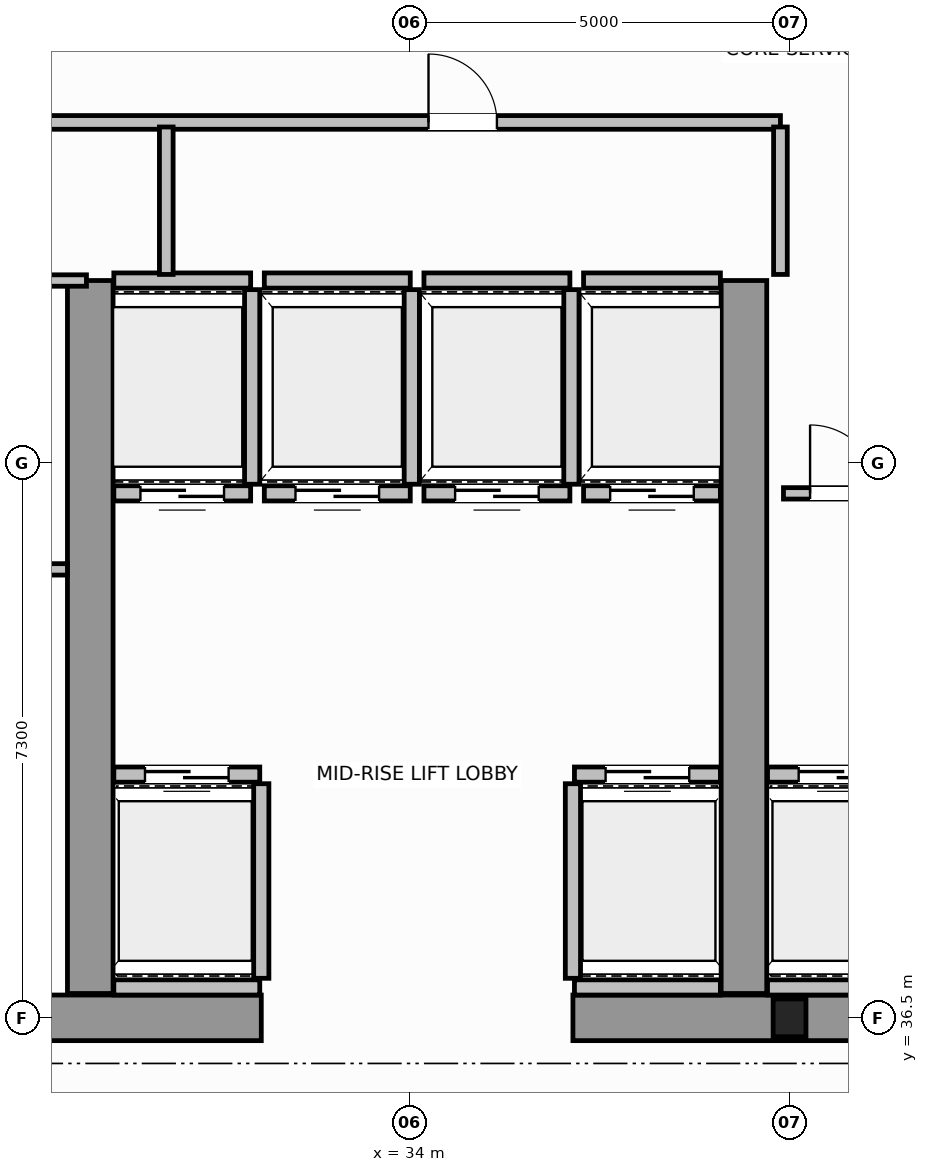
"""IFC4 building model, lengths in metres.
Left out: names, types, materials, properties, quantities, classifications, styles, units other than length and angle.
Written with IfcOpenShell. Run it as: python <this file> out.ifc"""

import sys

from ifc_helpers import new_model, si_unit, direction, frame, frame_2d, origin, origin_2d, place, context, subcontext, project, spatial, rectangle, i_section, extrude, source, transform, mapped, element, fill, save


model = new_model("IFC4")
c1 = context("Model", 3, precision=1e-05, world=origin(), true_north=direction((0.0, 1.0)))
c2 = subcontext(c1, "Body", "Model", "MODEL_VIEW")
j1 = project(units=[si_unit("LENGTHUNIT", "METRE"), si_unit("PLANEANGLEUNIT", "RADIAN")], contexts=[c1])
p1 = place(None, origin())
s1 = spatial("IfcSite", under=j1, at=p1, CompositionType="ELEMENT")
p2 = place(p1, origin())
s2 = spatial("IfcBuilding", under=s1, at=p2, CompositionType="ELEMENT")
p3 = place(p2, frame((0.0, 0.0, 199.4)))
s3 = spatial("IfcBuildingStorey", under=s2, at=p3, CompositionType="ELEMENT", Elevation=199.4)
m1 = source(origin(), c2, "Body", "SweptSolid", [
    extrude(i_section(OverallWidth=0.432, OverallDepth=0.498, WebThickness=0.055, FlangeThickness=0.068, FilletRadius=0.015, at=origin_2d()), origin(), (0.0, 0.0, 1.0), 3.8),
])
p4 = place(p3, frame((39.0, 36.5, 0.0), z_axis=(0.0, 0.0, 1.0), x_axis=(1.0, 0.0, 0.0)))
e1 = element("IfcColumn", 1, at=p4, inside=s3, PredefinedType="COLUMN", context=c2, shape_type="MappedRepresentation", body=[
    mapped(m1, transform((0.0, 0.0, 0.0), scale=1.0)),
])
for number, where, z_axis, x_axis in (
    (2, (27.55, 36.5, 0.0), (0.0, 0.0, 1.0), (1.0, 0.0, 0.0)),
    (3, (36.15, 36.5, 0.0), (0.0, 0.0, 1.0), (1.0, 0.0, 0.0)),
):
    element("IfcWall", number, at=place(p3, frame(where, z_axis=z_axis, x_axis=x_axis)), inside=s3, PredefinedType="SHEAR", context=c2, shape_type="SweptSolid", body=[
        extrude(rectangle(XDim=4.5, YDim=0.6, at=frame_2d((2.25, 0.0))), origin(), (0.0, 0.0, 1.0), 3.8),
    ])
for number, where, z_axis, x_axis in (
    (4, (29.8, 36.82, 0.0), (0.0, 0.0, 1.0), (0.0, 1.0, 0.0)),
    (5, (38.4, 36.82, 0.0), (0.0, 0.0, 1.0), (0.0, 1.0, 0.0)),
):
    element("IfcWall", number, at=place(p3, frame(where, z_axis=z_axis, x_axis=x_axis)), inside=s3, PredefinedType="SHEAR", context=c2, shape_type="SweptSolid", body=[
        extrude(rectangle(XDim=9.38, YDim=0.6, at=frame_2d((4.69, 0.0))), origin(), (0.0, 0.0, 1.0), 3.8),
    ])
p5 = place(p3, frame((30.11, 39.7, 0.0), z_axis=(0.0, 0.0, 1.0), x_axis=(1.0, 0.0, 0.0)))
e6 = element("IfcWall", 6, at=p5, inside=s3, PredefinedType="SOLIDWALL", context=c2, shape_type="SweptSolid", body=[
    extrude(rectangle(XDim=1.92, YDim=0.2, at=frame_2d((0.96, 0.0))), origin(), (0.0, 0.0, 1.0), 3.58),
])
p6 = place(p5, frame((0.41, 0.0, 0.0)))
e7 = element("IfcOpeningElement", 7, at=p6, cuts=e6, PredefinedType="OPENING", context=c2, shape_type="SweptSolid", body=[
    extrude(rectangle(XDim=1.1, YDim=2.15, at=frame_2d((0.55, 1.075))), frame((0.0, 0.11, 0.0), z_axis=(0.0, -1.0, 0.0), x_axis=(1.0, 0.0, 0.0)), (0.0, 0.0, 1.0), 0.22),
])
p7 = place(p3, frame((30.11, 36.9, 0.0), z_axis=(0.0, 0.0, 1.0), x_axis=(1.0, 0.0, 0.0)))
e8 = element("IfcWall", 8, at=p7, inside=s3, PredefinedType="SOLIDWALL", context=c2, shape_type="SweptSolid", body=[
    extrude(rectangle(XDim=1.92, YDim=0.2, at=frame_2d((0.96, 0.0))), origin(), (0.0, 0.0, 1.0), 3.58),
])
p8 = place(p3, frame((32.05, 37.02, 0.0), z_axis=(0.0, 0.0, 1.0), x_axis=(0.0, 1.0, 0.0)))
e9 = element("IfcWall", 9, at=p8, inside=s3, PredefinedType="SOLIDWALL", context=c2, shape_type="SweptSolid", body=[
    extrude(rectangle(XDim=2.56, YDim=0.2, at=frame_2d((1.28, 0.0))), origin(), (0.0, 0.0, 1.0), 3.58),
])
p9 = place(p3, frame((36.17, 39.7, 0.0), z_axis=(0.0, 0.0, 1.0), x_axis=(1.0, 0.0, 0.0)))
e10 = element("IfcWall", 10, at=p9, inside=s3, PredefinedType="SOLIDWALL", context=c2, shape_type="SweptSolid", body=[
    extrude(rectangle(XDim=1.92, YDim=0.2, at=frame_2d((0.96, 0.0))), origin(), (0.0, 0.0, 1.0), 3.58),
])
p10 = place(p9, frame((0.41, 0.0, 0.0)))
e11 = element("IfcOpeningElement", 11, at=p10, cuts=e10, PredefinedType="OPENING", context=c2, shape_type="SweptSolid", body=[
    extrude(rectangle(XDim=1.1, YDim=2.15, at=frame_2d((0.55, 1.075))), frame((0.0, 0.11, 0.0), z_axis=(0.0, -1.0, 0.0), x_axis=(1.0, 0.0, 0.0)), (0.0, 0.0, 1.0), 0.22),
])
p11 = place(p3, frame((36.17, 36.9, 0.0), z_axis=(0.0, 0.0, 1.0), x_axis=(1.0, 0.0, 0.0)))
e12 = element("IfcWall", 12, at=p11, inside=s3, PredefinedType="SOLIDWALL", context=c2, shape_type="SweptSolid", body=[
    extrude(rectangle(XDim=1.92, YDim=0.2, at=frame_2d((0.96, 0.0))), origin(), (0.0, 0.0, 1.0), 3.58),
])
p12 = place(p3, frame((36.15, 37.02, 0.0), z_axis=(0.0, 0.0, 1.0), x_axis=(0.0, 1.0, 0.0)))
e13 = element("IfcWall", 13, at=p12, inside=s3, PredefinedType="SOLIDWALL", context=c2, shape_type="SweptSolid", body=[
    extrude(rectangle(XDim=2.56, YDim=0.2, at=frame_2d((1.28, 0.0))), origin(), (0.0, 0.0, 1.0), 3.58),
])
p13 = place(p3, frame((30.11, 43.4, 0.0), z_axis=(0.0, 0.0, 1.0), x_axis=(1.0, 0.0, 0.0)))
e14 = element("IfcWall", 14, at=p13, inside=s3, PredefinedType="SOLIDWALL", context=c2, shape_type="SweptSolid", body=[
    extrude(rectangle(XDim=1.8, YDim=0.2, at=frame_2d((0.9, 0.0))), origin(), (0.0, 0.0, 1.0), 3.58),
])
p14 = place(p13, frame((0.35, 0.0, 0.0)))
e15 = element("IfcOpeningElement", 15, at=p14, cuts=e14, PredefinedType="OPENING", context=c2, shape_type="SweptSolid", body=[
    extrude(rectangle(XDim=1.1, YDim=2.15, at=frame_2d((0.55, 1.075))), frame((0.0, 0.11, 0.0), z_axis=(0.0, -1.0, 0.0), x_axis=(1.0, 0.0, 0.0)), (0.0, 0.0, 1.0), 0.22),
])
p15 = place(p3, frame((30.11, 46.2, 0.0), z_axis=(0.0, 0.0, 1.0), x_axis=(1.0, 0.0, 0.0)))
e16 = element("IfcWall", 16, at=p15, inside=s3, PredefinedType="SOLIDWALL", context=c2, shape_type="SweptSolid", body=[
    extrude(rectangle(XDim=1.8, YDim=0.2, at=frame_2d((0.9, 0.0))), origin(), (0.0, 0.0, 1.0), 3.58),
])
p16 = place(p3, frame((31.93, 43.52, 0.0), z_axis=(0.0, 0.0, 1.0), x_axis=(0.0, 1.0, 0.0)))
e17 = element("IfcWall", 17, at=p16, inside=s3, PredefinedType="SOLIDWALL", context=c2, shape_type="SweptSolid", body=[
    extrude(rectangle(XDim=2.56, YDim=0.2, at=frame_2d((1.28, 0.0))), origin(), (0.0, 0.0, 1.0), 3.58),
])
p17 = place(p3, frame((32.09, 43.4, 0.0), z_axis=(0.0, 0.0, 1.0), x_axis=(1.0, 0.0, 0.0)))
e18 = element("IfcWall", 18, at=p17, inside=s3, PredefinedType="SOLIDWALL", context=c2, shape_type="SweptSolid", body=[
    extrude(rectangle(XDim=1.92, YDim=0.2, at=frame_2d((0.96, 0.0))), origin(), (0.0, 0.0, 1.0), 3.58),
])
p18 = place(p17, frame((0.41, 0.0, 0.0)))
e19 = element("IfcOpeningElement", 19, at=p18, cuts=e18, PredefinedType="OPENING", context=c2, shape_type="SweptSolid", body=[
    extrude(rectangle(XDim=1.1, YDim=2.15, at=frame_2d((0.55, 1.075))), frame((0.0, 0.11, 0.0), z_axis=(0.0, -1.0, 0.0), x_axis=(1.0, 0.0, 0.0)), (0.0, 0.0, 1.0), 0.22),
])
p19 = place(p3, frame((32.09, 46.2, 0.0), z_axis=(0.0, 0.0, 1.0), x_axis=(1.0, 0.0, 0.0)))
e20 = element("IfcWall", 20, at=p19, inside=s3, PredefinedType="SOLIDWALL", context=c2, shape_type="SweptSolid", body=[
    extrude(rectangle(XDim=1.92, YDim=0.2, at=frame_2d((0.96, 0.0))), origin(), (0.0, 0.0, 1.0), 3.58),
])
p20 = place(p3, frame((34.03, 43.52, 0.0), z_axis=(0.0, 0.0, 1.0), x_axis=(0.0, 1.0, 0.0)))
e21 = element("IfcWall", 21, at=p20, inside=s3, PredefinedType="SOLIDWALL", context=c2, shape_type="SweptSolid", body=[
    extrude(rectangle(XDim=2.56, YDim=0.2, at=frame_2d((1.28, 0.0))), origin(), (0.0, 0.0, 1.0), 3.58),
])
p21 = place(p3, frame((34.19, 43.4, 0.0), z_axis=(0.0, 0.0, 1.0), x_axis=(1.0, 0.0, 0.0)))
e22 = element("IfcWall", 22, at=p21, inside=s3, PredefinedType="SOLIDWALL", context=c2, shape_type="SweptSolid", body=[
    extrude(rectangle(XDim=1.92, YDim=0.2, at=frame_2d((0.96, 0.0))), origin(), (0.0, 0.0, 1.0), 3.58),
])
p22 = place(p21, frame((0.41, 0.0, 0.0)))
e23 = element("IfcOpeningElement", 23, at=p22, cuts=e22, PredefinedType="OPENING", context=c2, shape_type="SweptSolid", body=[
    extrude(rectangle(XDim=1.1, YDim=2.15, at=frame_2d((0.55, 1.075))), frame((0.0, 0.11, 0.0), z_axis=(0.0, -1.0, 0.0), x_axis=(1.0, 0.0, 0.0)), (0.0, 0.0, 1.0), 0.22),
])
p23 = place(p3, frame((34.19, 46.2, 0.0), z_axis=(0.0, 0.0, 1.0), x_axis=(1.0, 0.0, 0.0)))
e24 = element("IfcWall", 24, at=p23, inside=s3, PredefinedType="SOLIDWALL", context=c2, shape_type="SweptSolid", body=[
    extrude(rectangle(XDim=1.92, YDim=0.2, at=frame_2d((0.96, 0.0))), origin(), (0.0, 0.0, 1.0), 3.58),
])
p24 = place(p3, frame((36.13, 43.52, 0.0), z_axis=(0.0, 0.0, 1.0), x_axis=(0.0, 1.0, 0.0)))
e25 = element("IfcWall", 25, at=p24, inside=s3, PredefinedType="SOLIDWALL", context=c2, shape_type="SweptSolid", body=[
    extrude(rectangle(XDim=2.56, YDim=0.2, at=frame_2d((1.28, 0.0))), origin(), (0.0, 0.0, 1.0), 3.58),
])
p25 = place(p3, frame((36.29, 43.4, 0.0), z_axis=(0.0, 0.0, 1.0), x_axis=(1.0, 0.0, 0.0)))
e26 = element("IfcWall", 26, at=p25, inside=s3, PredefinedType="SOLIDWALL", context=c2, shape_type="SweptSolid", body=[
    extrude(rectangle(XDim=1.8, YDim=0.2, at=frame_2d((0.9, 0.0))), origin(), (0.0, 0.0, 1.0), 3.58),
])
p26 = place(p25, frame((0.35, 0.0, 0.0)))
e27 = element("IfcOpeningElement", 27, at=p26, cuts=e26, PredefinedType="OPENING", context=c2, shape_type="SweptSolid", body=[
    extrude(rectangle(XDim=1.1, YDim=2.15, at=frame_2d((0.55, 1.075))), frame((0.0, 0.11, 0.0), z_axis=(0.0, -1.0, 0.0), x_axis=(1.0, 0.0, 0.0)), (0.0, 0.0, 1.0), 0.22),
])
p27 = place(p3, frame((36.29, 46.2, 0.0), z_axis=(0.0, 0.0, 1.0), x_axis=(1.0, 0.0, 0.0)))
e28 = element("IfcWall", 28, at=p27, inside=s3, PredefinedType="SOLIDWALL", context=c2, shape_type="SweptSolid", body=[
    extrude(rectangle(XDim=1.8, YDim=0.2, at=frame_2d((0.9, 0.0))), origin(), (0.0, 0.0, 1.0), 3.58),
])
p28 = place(p3, frame((38.71, 39.7, 0.0), z_axis=(0.0, 0.0, 1.0), x_axis=(1.0, 0.0, 0.0)))
e29 = element("IfcWall", 29, at=p28, inside=s3, PredefinedType="SOLIDWALL", context=c2, shape_type="SweptSolid", body=[
    extrude(rectangle(XDim=1.92, YDim=0.2, at=frame_2d((0.96, 0.0))), origin(), (0.0, 0.0, 1.0), 3.58),
])
p29 = place(p28, frame((0.41, 0.0, 0.0)))
e30 = element("IfcOpeningElement", 30, at=p29, cuts=e29, PredefinedType="OPENING", context=c2, shape_type="SweptSolid", body=[
    extrude(rectangle(XDim=1.1, YDim=2.15, at=frame_2d((0.55, 1.075))), frame((0.0, 0.11, 0.0), z_axis=(0.0, -1.0, 0.0), x_axis=(1.0, 0.0, 0.0)), (0.0, 0.0, 1.0), 0.22),
])
p30 = place(p3, frame((38.71, 36.9, 0.0), z_axis=(0.0, 0.0, 1.0), x_axis=(1.0, 0.0, 0.0)))
e31 = element("IfcWall", 31, at=p30, inside=s3, PredefinedType="SOLIDWALL", context=c2, shape_type="SweptSolid", body=[
    extrude(rectangle(XDim=1.92, YDim=0.2, at=frame_2d((0.96, 0.0))), origin(), (0.0, 0.0, 1.0), 3.58),
])
p31 = place(p3, frame((21.25, 46.2, 0.0), z_axis=(0.0, 0.0, 1.0), x_axis=(1.0, 0.0, 0.0)))
e32 = element("IfcWall", 32, at=p31, inside=s3, PredefinedType="PARTITIONING", context=c2, shape_type="SweptSolid", body=[
    extrude(rectangle(XDim=8.5, YDim=0.15, at=frame_2d((4.25, 0.0))), origin(), (0.0, 0.0, 1.0), 3.58),
])
p32 = place(p3, frame((21.5, 42.4, 0.0), z_axis=(0.0, 0.0, 1.0), x_axis=(1.0, 0.0, 0.0)))
e33 = element("IfcWall", 33, at=p32, inside=s3, PredefinedType="PARTITIONING", context=c2, shape_type="SweptSolid", body=[
    extrude(rectangle(XDim=8.0, YDim=0.15, at=frame_2d((4.0, 0.0))), origin(), (0.0, 0.0, 1.0), 3.58),
])
p33 = place(p32, frame((3.4, 0.0, 0.0)))
e34 = element("IfcOpeningElement", 34, at=p33, cuts=e33, PredefinedType="OPENING", context=c2, shape_type="SweptSolid", body=[
    extrude(rectangle(XDim=0.9, YDim=2.1, at=frame_2d((0.45, 1.05))), frame((0.0, 0.085, 0.0), z_axis=(0.0, -1.0, 0.0), x_axis=(1.0, 0.0, 0.0)), (0.0, 0.0, 1.0), 0.17),
])
p34 = place(p3, frame((38.92, 43.4, 0.0), z_axis=(0.0, 0.0, 1.0), x_axis=(1.0, 0.0, 0.0)))
e35 = element("IfcWall", 35, at=p34, inside=s3, PredefinedType="PARTITIONING", context=c2, shape_type="SweptSolid", body=[
    extrude(rectangle(XDim=1.6, YDim=0.15, at=frame_2d((0.8, 0.0))), origin(), (0.0, 0.0, 1.0), 3.58),
])
p35 = place(p34, frame((0.35, 0.0, 0.0)))
e36 = element("IfcOpeningElement", 36, at=p35, cuts=e35, PredefinedType="OPENING", context=c2, shape_type="SweptSolid", body=[
    extrude(rectangle(XDim=0.9, YDim=2.1, at=frame_2d((0.45, 1.05))), frame((0.0, 0.085, 0.0), z_axis=(0.0, -1.0, 0.0), x_axis=(1.0, 0.0, 0.0)), (0.0, 0.0, 1.0), 0.17),
])
p36 = place(p3, frame((23.85, 48.28, 0.0), z_axis=(0.0, 0.0, 1.0), x_axis=(1.0, 0.0, 0.0)))
e37 = element("IfcWall", 37, at=p36, inside=s3, PredefinedType="PLUMBINGWALL", context=c2, shape_type="SweptSolid", body=[
    extrude(rectangle(XDim=15.03, YDim=0.18, at=frame_2d((7.515, 0.0))), origin(), (0.0, 0.0, 1.0), 3.58),
])
p37 = place(p36, frame((2.9, 0.0, 0.0)))
e38 = element("IfcOpeningElement", 38, at=p37, cuts=e37, PredefinedType="OPENING", context=c2, shape_type="SweptSolid", body=[
    extrude(rectangle(XDim=0.9, YDim=2.15, at=frame_2d((0.45, 1.075))), frame((0.0, 0.1, 0.0), z_axis=(0.0, -1.0, 0.0), x_axis=(1.0, 0.0, 0.0)), (0.0, 0.0, 1.0), 0.2),
])
p38 = place(p36, frame((10.4, 0.0, 0.0)))
e39 = element("IfcOpeningElement", 39, at=p38, cuts=e37, PredefinedType="OPENING", context=c2, shape_type="SweptSolid", body=[
    extrude(rectangle(XDim=0.9, YDim=2.15, at=frame_2d((0.45, 1.075))), frame((0.0, 0.1, 0.0), z_axis=(0.0, -1.0, 0.0), x_axis=(1.0, 0.0, 0.0)), (0.0, 0.0, 1.0), 0.2),
])
for number, where, z_axis, x_axis in (
    (40, (30.8, 46.28, 0.0), (0.0, 0.0, 1.0), (0.0, 1.0, 0.0)),
    (41, (38.88, 46.28, 0.0), (0.0, 0.0, 1.0), (0.0, 1.0, 0.0)),
):
    element("IfcWall", number, at=place(p3, frame(where, z_axis=z_axis, x_axis=x_axis)), inside=s3, PredefinedType="PLUMBINGWALL", context=c2, shape_type="SweptSolid", body=[
        extrude(rectangle(XDim=1.94, YDim=0.18, at=frame_2d((0.97, 0.0))), origin(), (0.0, 0.0, 1.0), 3.58),
    ])
m2 = source(origin(), c2, "Body", "SweptSolid", [
    extrude(rectangle(XDim=1.1, YDim=2.15, at=frame_2d((0.55, 1.075))), frame((0.0, 0.025, 0.0), z_axis=(0.0, -1.0, 0.0), x_axis=(1.0, 0.0, 0.0)), (0.0, 0.0, 1.0), 0.05),
])
p39 = place(p6, origin())
e42 = element("IfcDoor", 42, at=p39, inside=s3, OperationType="DOUBLE_DOOR_SLIDING", PredefinedType="DOOR", context=c2, shape_type="MappedRepresentation", body=[
    mapped(m2, transform((0.0, 0.0, 0.0), scale=1.0)),
])
fill(e7, e42)
p40 = place(p10, origin())
e43 = element("IfcDoor", 43, at=p40, inside=s3, OperationType="DOUBLE_DOOR_SLIDING", PredefinedType="DOOR", context=c2, shape_type="MappedRepresentation", body=[
    mapped(m2, transform((0.0, 0.0, 0.0), scale=1.0)),
])
fill(e11, e43)
p41 = place(p14, origin())
e44 = element("IfcDoor", 44, at=p41, inside=s3, OperationType="DOUBLE_DOOR_SLIDING", PredefinedType="DOOR", context=c2, shape_type="MappedRepresentation", body=[
    mapped(m2, transform((0.0, 0.0, 0.0), scale=1.0)),
])
fill(e15, e44)
p42 = place(p18, origin())
e45 = element("IfcDoor", 45, at=p42, inside=s3, OperationType="DOUBLE_DOOR_SLIDING", PredefinedType="DOOR", context=c2, shape_type="MappedRepresentation", body=[
    mapped(m2, transform((0.0, 0.0, 0.0), scale=1.0)),
])
fill(e19, e45)
p43 = place(p22, origin())
e46 = element("IfcDoor", 46, at=p43, inside=s3, OperationType="DOUBLE_DOOR_SLIDING", PredefinedType="DOOR", context=c2, shape_type="MappedRepresentation", body=[
    mapped(m2, transform((0.0, 0.0, 0.0), scale=1.0)),
])
fill(e23, e46)
p44 = place(p26, origin())
e47 = element("IfcDoor", 47, at=p44, inside=s3, OperationType="DOUBLE_DOOR_SLIDING", PredefinedType="DOOR", context=c2, shape_type="MappedRepresentation", body=[
    mapped(m2, transform((0.0, 0.0, 0.0), scale=1.0)),
])
fill(e27, e47)
p45 = place(p29, origin())
e48 = element("IfcDoor", 48, at=p45, inside=s3, OperationType="DOUBLE_DOOR_SLIDING", PredefinedType="DOOR", context=c2, shape_type="MappedRepresentation", body=[
    mapped(m2, transform((0.0, 0.0, 0.0), scale=1.0)),
])
fill(e30, e48)
m3 = source(origin(), c2, "Body", "SweptSolid", [
    extrude(rectangle(XDim=0.9, YDim=2.1, at=frame_2d((0.45, 1.05))), frame((0.0, 0.025, 0.0), z_axis=(0.0, -1.0, 0.0), x_axis=(1.0, 0.0, 0.0)), (0.0, 0.0, 1.0), 0.05),
])
p46 = place(p35, origin())
e49 = element("IfcDoor", 49, at=p46, inside=s3, OperationType="SINGLE_SWING_LEFT", PredefinedType="DOOR", context=c2, shape_type="MappedRepresentation", body=[
    mapped(m3, transform((0.0, 0.0, 0.0), scale=1.0)),
])
fill(e36, e49)
m4 = source(origin(), c2, "Body", "SweptSolid", [
    extrude(rectangle(XDim=0.9, YDim=2.15, at=frame_2d((0.45, 1.075))), frame((0.0, 0.025, 0.0), z_axis=(0.0, -1.0, 0.0), x_axis=(1.0, 0.0, 0.0)), (0.0, 0.0, 1.0), 0.05),
])
p47 = place(p38, origin())
e50 = element("IfcDoor", 50, at=p47, inside=s3, OperationType="SINGLE_SWING_LEFT", PredefinedType="DOOR", context=c2, shape_type="MappedRepresentation", body=[
    mapped(m4, transform((0.0, 0.0, 0.0), scale=1.0)),
])
fill(e39, e50)
save(model, sys.argv[1])
